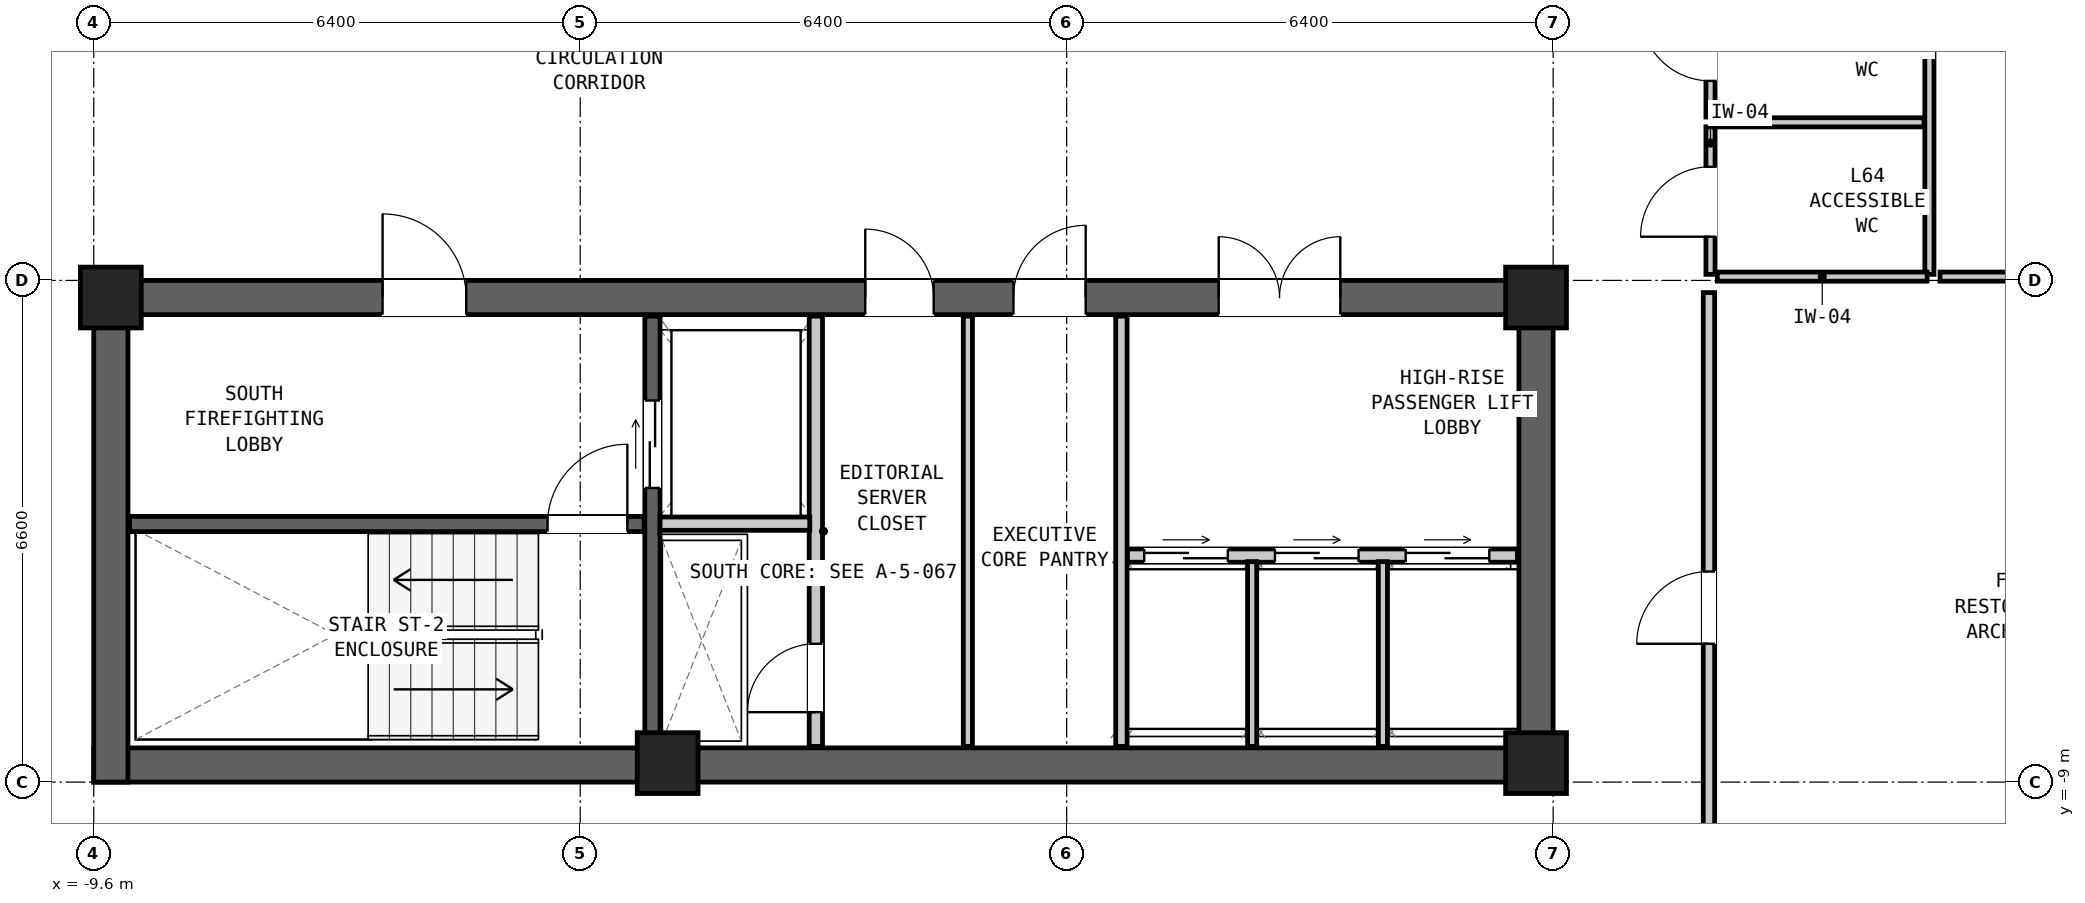
"""IFC4 building model, lengths in metres.
Left out: names, types, materials, properties, quantities, classifications, styles, units other than length and angle.
Written with IfcOpenShell. Run it as: python <this file> out.ifc"""

import sys

from ifc_helpers import new_model, si_unit, direction, frame, frame_2d, origin, origin_2d, place, context, subcontext, project, spatial, rectangle, extrude, element, fill, save


model = new_model("IFC4")
c1 = context("Model", 3, precision=1e-05, world=origin(), true_north=direction((0.0, 1.0)))
c2 = subcontext(c1, "Body", "Model", "MODEL_VIEW")
j1 = project(units=[si_unit("LENGTHUNIT", "METRE"), si_unit("PLANEANGLEUNIT", "RADIAN")], contexts=[c1])
p1 = place(None, origin())
s1 = spatial("IfcSite", under=j1, at=p1, CompositionType="ELEMENT")
p2 = place(p1, origin())
s2 = spatial("IfcBuilding", under=s1, at=p2, CompositionType="ELEMENT")
p3 = place(p2, frame((0.0, 0.0, 217.8)))
s3 = spatial("IfcBuildingStorey", under=s2, at=p3, CompositionType="ELEMENT", Elevation=217.8)
p4 = place(p3, frame((-9.6, -8.775, 0.0), z_axis=(0.0, 0.0, 1.0), x_axis=(1.0, 0.0, 0.0)))
e1 = element("IfcWall", 1, at=p4, inside=s3, PredefinedType="SHEAR", context=c2, shape_type="SweptSolid", body=[
    extrude(rectangle(XDim=19.2, YDim=0.45, at=frame_2d((9.6, 0.0))), origin(), (0.0, 0.0, 1.0), 3.05),
])
p5 = place(p3, frame((-9.6, -2.625, 0.0), z_axis=(0.0, 0.0, 1.0), x_axis=(1.0, 0.0, 0.0)))
e2 = element("IfcWall", 2, at=p5, inside=s3, PredefinedType="SHEAR", context=c2, shape_type="SweptSolid", body=[
    extrude(rectangle(XDim=19.2, YDim=0.45, at=frame_2d((9.6, 0.0))), origin(), (0.0, 0.0, 1.0), 3.05),
])
p6 = place(p5, frame((3.8, 0.0, 0.0)))
e3 = element("IfcOpeningElement", 3, at=p6, cuts=e2, PredefinedType="OPENING", context=c2, shape_type="SweptSolid", body=[
    extrude(rectangle(XDim=1.1, YDim=2.08, at=frame_2d((0.55, 1.04))), frame((0.0, 0.237, 0.0), z_axis=(0.0, -1.0, 0.0), x_axis=(1.0, 0.0, 0.0)), (0.0, 0.0, 1.0), 0.474),
])
p7 = place(p5, frame((10.15, 0.0, 0.0)))
e4 = element("IfcOpeningElement", 4, at=p7, cuts=e2, PredefinedType="OPENING", context=c2, shape_type="SweptSolid", body=[
    extrude(rectangle(XDim=0.9, YDim=2.05, at=frame_2d((0.45, 1.025))), frame((0.0, 0.237, 0.0), z_axis=(0.0, -1.0, 0.0), x_axis=(1.0, 0.0, 0.0)), (0.0, 0.0, 1.0), 0.474),
])
p8 = place(p5, frame((12.1, 0.0, 0.0)))
e5 = element("IfcOpeningElement", 5, at=p8, cuts=e2, PredefinedType="OPENING", context=c2, shape_type="SweptSolid", body=[
    extrude(rectangle(XDim=0.95, YDim=2.1, at=frame_2d((0.475, 1.05))), frame((0.0, 0.237, 0.0), z_axis=(0.0, -1.0, 0.0), x_axis=(1.0, 0.0, 0.0)), (0.0, 0.0, 1.0), 0.474),
])
p9 = place(p5, frame((14.8, 0.0, 0.0)))
e6 = element("IfcOpeningElement", 6, at=p9, cuts=e2, PredefinedType="OPENING", context=c2, shape_type="SweptSolid", body=[
    extrude(rectangle(XDim=1.6, YDim=2.12, at=frame_2d((0.8, 1.06))), frame((0.0, 0.237, 0.0), z_axis=(0.0, -1.0, 0.0), x_axis=(1.0, 0.0, 0.0)), (0.0, 0.0, 1.0), 0.474),
])
for number, where, z_axis, x_axis in (
    (7, (-9.375, -9.0, 0.0), (0.0, 0.0, 1.0), (0.0, 1.0, 0.0)),
    (8, (9.375, -9.0, 0.0), (0.0, 0.0, 1.0), (0.0, 1.0, 0.0)),
):
    element("IfcWall", number, at=place(p3, frame(where, z_axis=z_axis, x_axis=x_axis)), inside=s3, PredefinedType="SHEAR", context=c2, shape_type="SweptSolid", body=[
        extrude(rectangle(XDim=6.6, YDim=0.45, at=frame_2d((3.3, 0.0))), origin(), (0.0, 0.0, 1.0), 3.05),
    ])
for number, where, z_axis, x_axis in (
    (9, (-9.375, -2.625, 0.0), (0.0, 0.0, 1.0), (1.0, 0.0, 0.0)),
    (10, (9.375, -2.625, 0.0), (0.0, 0.0, 1.0), (1.0, 0.0, 0.0)),
    (11, (-2.05, -8.75, 0.0), (0.0, 0.0, 1.0), (1.0, 0.0, 0.0)),
    (12, (9.375, -8.75, 0.0), (0.0, 0.0, 1.0), (1.0, 0.0, 0.0)),
):
    element("IfcColumn", number, at=place(p3, frame(where, z_axis=z_axis, x_axis=x_axis)), inside=s3, PredefinedType="COLUMN", context=c2, shape_type="SweptSolid", body=[
        extrude(rectangle(XDim=0.8, YDim=0.8, at=origin_2d()), origin(), (0.0, 0.0, 1.0), 3.05),
    ])
p10 = place(p3, frame((-9.13, -5.605, 0.0), z_axis=(0.0, 0.0, 1.0), x_axis=(1.0, 0.0, 0.0)))
e13 = element("IfcWall", 13, at=p10, inside=s3, PredefinedType="SHEAR", context=c2, shape_type="SweptSolid", body=[
    extrude(rectangle(XDim=6.77, YDim=0.2, at=frame_2d((3.385, 0.0))), origin(), (0.0, 0.0, 1.0), 2.86),
])
p11 = place(p10, frame((5.5, 0.0, 0.0)))
e14 = element("IfcOpeningElement", 14, at=p11, cuts=e13, PredefinedType="OPENING", context=c2, shape_type="SweptSolid", body=[
    extrude(rectangle(XDim=1.05, YDim=2.08, at=frame_2d((0.525, 1.04))), frame((0.0, 0.112, 0.0), z_axis=(0.0, -1.0, 0.0), x_axis=(1.0, 0.0, 0.0)), (0.0, 0.0, 1.0), 0.224),
])
p12 = place(p3, frame((-2.25, -8.53, 0.0), z_axis=(0.0, 0.0, 1.0), x_axis=(0.0, 1.0, 0.0)))
e15 = element("IfcWall", 15, at=p12, inside=s3, PredefinedType="SHEAR", context=c2, shape_type="SweptSolid", body=[
    extrude(rectangle(XDim=5.66, YDim=0.2, at=frame_2d((2.83, 0.0))), origin(), (0.0, 0.0, 1.0), 2.86),
])
p13 = place(p12, frame((3.4, 0.0, 0.0)))
e16 = element("IfcOpeningElement", 16, at=p13, cuts=e15, PredefinedType="OPENING", context=c2, shape_type="SweptSolid", body=[
    extrude(rectangle(XDim=1.15, YDim=2.08, at=frame_2d((0.575, 1.04))), frame((0.0, 0.112, 0.0), z_axis=(0.0, -1.0, 0.0), x_axis=(1.0, 0.0, 0.0)), (0.0, 0.0, 1.0), 0.224),
])
p14 = place(p3, frame((-0.1, -8.53, 0.0), z_axis=(0.0, 0.0, 1.0), x_axis=(0.0, 1.0, 0.0)))
e17 = element("IfcWall", 17, at=p14, inside=s3, PredefinedType="PARTITIONING", context=c2, shape_type="SweptSolid", body=[
    extrude(rectangle(XDim=5.66, YDim=0.175, at=frame_2d((2.83, 0.0))), origin(), (0.0, 0.0, 1.0), 2.86),
])
p15 = place(p14, frame((0.45, 0.0, 0.0)))
e18 = element("IfcOpeningElement", 18, at=p15, cuts=e17, PredefinedType="OPENING", context=c2, shape_type="SweptSolid", body=[
    extrude(rectangle(XDim=0.9, YDim=2.05, at=frame_2d((0.45, 1.025))), frame((0.0, 0.1, 0.0), z_axis=(0.0, -1.0, 0.0), x_axis=(1.0, 0.0, 0.0)), (0.0, 0.0, 1.0), 0.199),
])
p16 = place(p3, frame((-2.15, -5.6, 0.0), z_axis=(0.0, 0.0, 1.0), x_axis=(1.0, 0.0, 0.0)))
e19 = element("IfcWall", 19, at=p16, inside=s3, PredefinedType="PARTITIONING", context=c2, shape_type="SweptSolid", body=[
    extrude(rectangle(XDim=1.97, YDim=0.175, at=frame_2d((0.985, 0.0))), origin(), (0.0, 0.0, 1.0), 2.86),
])
p17 = place(p3, frame((3.92, -8.53, 0.0), z_axis=(0.0, 0.0, 1.0), x_axis=(0.0, 1.0, 0.0)))
e20 = element("IfcWall", 20, at=p17, inside=s3, PredefinedType="PARTITIONING", context=c2, shape_type="SweptSolid", body=[
    extrude(rectangle(XDim=5.66, YDim=0.15, at=frame_2d((2.83, 0.0))), origin(), (0.0, 0.0, 1.0), 2.86),
])
p18 = place(p3, frame((1.9, -8.53, 0.0), z_axis=(0.0, 0.0, 1.0), x_axis=(0.0, 1.0, 0.0)))
e21 = element("IfcWall", 21, at=p18, inside=s3, PredefinedType="PARTITIONING", context=c2, shape_type="SweptSolid", body=[
    extrude(rectangle(XDim=5.66, YDim=0.12, at=frame_2d((2.83, 0.0))), origin(), (0.0, 0.0, 1.0), 2.86),
])
p19 = place(p3, frame((4.0, -6.02, 0.0), z_axis=(0.0, 0.0, 1.0), x_axis=(1.0, 0.0, 0.0)))
e22 = element("IfcWall", 22, at=p19, inside=s3, PredefinedType="PARTITIONING", context=c2, shape_type="SweptSolid", body=[
    extrude(rectangle(XDim=5.13, YDim=0.175, at=frame_2d((2.565, 0.0))), origin(), (0.0, 0.0, 1.0), 2.86),
])
p20 = place(p19, frame((0.22, 0.0, 0.0)))
e23 = element("IfcOpeningElement", 23, at=p20, cuts=e22, PredefinedType="OPENING", context=c2, shape_type="SweptSolid", body=[
    extrude(rectangle(XDim=1.1, YDim=2.06, at=frame_2d((0.55, 1.03))), frame((0.0, 0.1, 0.0), z_axis=(0.0, -1.0, 0.0), x_axis=(1.0, 0.0, 0.0)), (0.0, 0.0, 1.0), 0.199),
])
p21 = place(p19, frame((1.94, 0.0, 0.0)))
e24 = element("IfcOpeningElement", 24, at=p21, cuts=e22, PredefinedType="OPENING", context=c2, shape_type="SweptSolid", body=[
    extrude(rectangle(XDim=1.1, YDim=2.06, at=frame_2d((0.55, 1.03))), frame((0.0, 0.1, 0.0), z_axis=(0.0, -1.0, 0.0), x_axis=(1.0, 0.0, 0.0)), (0.0, 0.0, 1.0), 0.199),
])
p22 = place(p19, frame((3.66, 0.0, 0.0)))
e25 = element("IfcOpeningElement", 25, at=p22, cuts=e22, PredefinedType="OPENING", context=c2, shape_type="SweptSolid", body=[
    extrude(rectangle(XDim=1.1, YDim=2.06, at=frame_2d((0.55, 1.03))), frame((0.0, 0.1, 0.0), z_axis=(0.0, -1.0, 0.0), x_axis=(1.0, 0.0, 0.0)), (0.0, 0.0, 1.0), 0.199),
])
for number, where, z_axis, x_axis in (
    (26, (5.64, -8.53, 0.0), (0.0, 0.0, 1.0), (0.0, 1.0, 0.0)),
    (27, (7.36, -8.53, 0.0), (0.0, 0.0, 1.0), (0.0, 1.0, 0.0)),
):
    element("IfcWall", number, at=place(p3, frame(where, z_axis=z_axis, x_axis=x_axis)), inside=s3, PredefinedType="PARTITIONING", context=c2, shape_type="SweptSolid", body=[
        extrude(rectangle(XDim=2.43, YDim=0.12, at=frame_2d((1.215, 0.0))), origin(), (0.0, 0.0, 1.0), 2.86),
    ])
p23 = place(p3, frame((11.67, -2.32, 0.0), z_axis=(0.0, 0.0, 1.0), x_axis=(0.0, 1.0, 0.0)))
e28 = element("IfcWall", 28, at=p23, inside=s3, PredefinedType="PARTITIONING", context=c2, shape_type="SweptSolid", body=[
    extrude(rectangle(XDim=1.94, YDim=0.12, at=frame_2d((0.97, 0.0))), origin(), (0.0, 0.0, 1.0), 2.86),
])
p24 = place(p23, frame((0.495, 0.0, 0.0)))
e29 = element("IfcOpeningElement", 29, at=p24, cuts=e28, PredefinedType="OPENING", context=c2, shape_type="SweptSolid", body=[
    extrude(rectangle(XDim=0.92, YDim=2.1, at=frame_2d((0.46, 1.05))), frame((0.0, 0.072, 0.0), z_axis=(0.0, -1.0, 0.0), x_axis=(1.0, 0.0, 0.0)), (0.0, 0.0, 1.0), 0.144),
])
p25 = place(p3, frame((11.67, -0.25, 0.0), z_axis=(0.0, 0.0, 1.0), x_axis=(0.0, 1.0, 0.0)))
e30 = element("IfcWall", 30, at=p25, inside=s3, PredefinedType="PARTITIONING", context=c2, shape_type="SweptSolid", body=[
    extrude(rectangle(XDim=1.9, YDim=0.12, at=frame_2d((0.95, 0.0))), origin(), (0.0, 0.0, 1.0), 2.86),
])
p26 = place(p25, frame((0.475, 0.0, 0.0)))
e31 = element("IfcOpeningElement", 31, at=p26, cuts=e30, PredefinedType="OPENING", context=c2, shape_type="SweptSolid", body=[
    extrude(rectangle(XDim=0.92, YDim=2.1, at=frame_2d((0.46, 1.05))), frame((0.0, 0.072, 0.0), z_axis=(0.0, -1.0, 0.0), x_axis=(1.0, 0.0, 0.0)), (0.0, 0.0, 1.0), 0.144),
])
p27 = place(p3, frame((14.55, -2.32, 0.0), z_axis=(0.0, 0.0, 1.0), x_axis=(0.0, 1.0, 0.0)))
e32 = element("IfcWall", 32, at=p27, inside=s3, PredefinedType="PARTITIONING", context=c2, shape_type="SweptSolid", body=[
    extrude(rectangle(XDim=5.93, YDim=0.12, at=frame_2d((2.965, 0.0))), origin(), (0.0, 0.0, 1.0), 2.86),
])
p28 = place(p3, frame((11.76, -2.35, 0.0), z_axis=(0.0, 0.0, 1.0), x_axis=(1.0, 0.0, 0.0)))
e33 = element("IfcWall", 33, at=p28, inside=s3, PredefinedType="PARTITIONING", context=c2, shape_type="SweptSolid", body=[
    extrude(rectangle(XDim=2.76, YDim=0.12, at=frame_2d((1.38, 0.0))), origin(), (0.0, 0.0, 1.0), 1.981),
])
p29 = place(p3, frame((11.76, -0.32, 0.0), z_axis=(0.0, 0.0, 1.0), x_axis=(1.0, 0.0, 0.0)))
e34 = element("IfcWall", 34, at=p29, inside=s3, PredefinedType="PARTITIONING", context=c2, shape_type="SweptSolid", body=[
    extrude(rectangle(XDim=2.72, YDim=0.12, at=frame_2d((1.36, 0.0))), origin(), (0.0, 0.0, 1.0), 2.86),
])
p30 = place(p3, frame((14.69, -2.35, 0.0), z_axis=(0.0, 0.0, 1.0), x_axis=(1.0, 0.0, 0.0)))
e35 = element("IfcWall", 35, at=p30, inside=s3, PredefinedType="PARTITIONING", context=c2, shape_type="SweptSolid", body=[
    extrude(rectangle(XDim=4.69, YDim=0.12, at=frame_2d((2.345, 0.0))), origin(), (0.0, 0.0, 1.0), 1.981),
])
p31 = place(p3, frame((11.65, -10.85, 0.0), z_axis=(0.0, 0.0, 1.0), x_axis=(0.0, 1.0, 0.0)))
e36 = element("IfcWall", 36, at=p31, inside=s3, PredefinedType="PARTITIONING", context=c2, shape_type="SweptSolid", body=[
    extrude(rectangle(XDim=8.29, YDim=0.15, at=frame_2d((4.145, 0.0))), origin(), (0.0, 0.0, 1.0), 2.86),
])
p32 = place(p31, frame((3.67, 0.0, 0.0)))
e37 = element("IfcOpeningElement", 37, at=p32, cuts=e36, PredefinedType="OPENING", context=c2, shape_type="SweptSolid", body=[
    extrude(rectangle(XDim=0.95, YDim=2.1, at=frame_2d((0.475, 1.05))), frame((0.0, 0.087, 0.0), z_axis=(0.0, -1.0, 0.0), x_axis=(1.0, 0.0, 0.0)), (0.0, 0.0, 1.0), 0.174),
])
p33 = place(p11, origin())
e38 = element("IfcDoor", 38, at=p33, inside=s3, OperationType="SINGLE_SWING_RIGHT", PredefinedType="DOOR", context=c2, shape_type="SweptSolid", body=[
    extrude(rectangle(XDim=1.05, YDim=2.08, at=frame_2d((0.525, 1.04))), frame((0.0, 0.025, 0.0), z_axis=(0.0, -1.0, 0.0), x_axis=(1.0, 0.0, 0.0)), (0.0, 0.0, 1.0), 0.05),
])
fill(e14, e38)
p34 = place(p6, origin())
e39 = element("IfcDoor", 39, at=p34, inside=s3, OperationType="SINGLE_SWING_LEFT", PredefinedType="DOOR", context=c2, shape_type="SweptSolid", body=[
    extrude(rectangle(XDim=1.1, YDim=2.08, at=frame_2d((0.55, 1.04))), frame((0.0, 0.025, 0.0), z_axis=(0.0, -1.0, 0.0), x_axis=(1.0, 0.0, 0.0)), (0.0, 0.0, 1.0), 0.05),
])
fill(e3, e39)
p35 = place(p13, origin())
e40 = element("IfcDoor", 40, at=p35, inside=s3, OperationType="DOUBLE_DOOR_SLIDING", PredefinedType="DOOR", context=c2, shape_type="SweptSolid", body=[
    extrude(rectangle(XDim=1.15, YDim=2.08, at=frame_2d((0.575, 1.04))), frame((0.0, 0.025, 0.0), z_axis=(0.0, -1.0, 0.0), x_axis=(1.0, 0.0, 0.0)), (0.0, 0.0, 1.0), 0.05),
])
fill(e16, e40)
p36 = place(p15, origin())
e41 = element("IfcDoor", 41, at=p36, inside=s3, OperationType="SINGLE_SWING_LEFT", PredefinedType="DOOR", context=c2, shape_type="SweptSolid", body=[
    extrude(rectangle(XDim=0.9, YDim=2.05, at=frame_2d((0.45, 1.025))), frame((0.0, 0.025, 0.0), z_axis=(0.0, -1.0, 0.0), x_axis=(1.0, 0.0, 0.0)), (0.0, 0.0, 1.0), 0.05),
])
fill(e18, e41)
p37 = place(p7, origin())
e42 = element("IfcDoor", 42, at=p37, inside=s3, OperationType="SINGLE_SWING_LEFT", PredefinedType="DOOR", context=c2, shape_type="SweptSolid", body=[
    extrude(rectangle(XDim=0.9, YDim=2.05, at=frame_2d((0.45, 1.025))), frame((0.0, 0.025, 0.0), z_axis=(0.0, -1.0, 0.0), x_axis=(1.0, 0.0, 0.0)), (0.0, 0.0, 1.0), 0.05),
])
fill(e4, e42)
p38 = place(p8, origin())
e43 = element("IfcDoor", 43, at=p38, inside=s3, OperationType="SINGLE_SWING_RIGHT", PredefinedType="DOOR", context=c2, shape_type="SweptSolid", body=[
    extrude(rectangle(XDim=0.95, YDim=2.1, at=frame_2d((0.475, 1.05))), frame((0.0, 0.025, 0.0), z_axis=(0.0, -1.0, 0.0), x_axis=(1.0, 0.0, 0.0)), (0.0, 0.0, 1.0), 0.05),
])
fill(e5, e43)
p39 = place(p20, origin())
e44 = element("IfcDoor", 44, at=p39, inside=s3, OperationType="DOUBLE_DOOR_SLIDING", PredefinedType="DOOR", context=c2, shape_type="SweptSolid", body=[
    extrude(rectangle(XDim=1.1, YDim=2.06, at=frame_2d((0.55, 1.03))), frame((0.0, 0.025, 0.0), z_axis=(0.0, -1.0, 0.0), x_axis=(1.0, 0.0, 0.0)), (0.0, 0.0, 1.0), 0.05),
])
fill(e23, e44)
p40 = place(p21, origin())
e45 = element("IfcDoor", 45, at=p40, inside=s3, OperationType="DOUBLE_DOOR_SLIDING", PredefinedType="DOOR", context=c2, shape_type="SweptSolid", body=[
    extrude(rectangle(XDim=1.1, YDim=2.06, at=frame_2d((0.55, 1.03))), frame((0.0, 0.025, 0.0), z_axis=(0.0, -1.0, 0.0), x_axis=(1.0, 0.0, 0.0)), (0.0, 0.0, 1.0), 0.05),
])
fill(e24, e45)
p41 = place(p22, origin())
e46 = element("IfcDoor", 46, at=p41, inside=s3, OperationType="DOUBLE_DOOR_SLIDING", PredefinedType="DOOR", context=c2, shape_type="SweptSolid", body=[
    extrude(rectangle(XDim=1.1, YDim=2.06, at=frame_2d((0.55, 1.03))), frame((0.0, 0.025, 0.0), z_axis=(0.0, -1.0, 0.0), x_axis=(1.0, 0.0, 0.0)), (0.0, 0.0, 1.0), 0.05),
])
fill(e25, e46)
p42 = place(p9, origin())
e47 = element("IfcDoor", 47, at=p42, inside=s3, OperationType="DOUBLE_DOOR_SINGLE_SWING", PredefinedType="DOOR", context=c2, shape_type="SweptSolid", body=[
    extrude(rectangle(XDim=1.6, YDim=2.12, at=frame_2d((0.8, 1.06))), frame((0.0, 0.025, 0.0), z_axis=(0.0, -1.0, 0.0), x_axis=(1.0, 0.0, 0.0)), (0.0, 0.0, 1.0), 0.05),
])
fill(e6, e47)
p43 = place(p24, origin())
e48 = element("IfcDoor", 48, at=p43, inside=s3, OperationType="SINGLE_SWING_LEFT", PredefinedType="DOOR", context=c2, shape_type="SweptSolid", body=[
    extrude(rectangle(XDim=0.92, YDim=2.1, at=frame_2d((0.46, 1.05))), frame((0.0, 0.025, 0.0), z_axis=(0.0, -1.0, 0.0), x_axis=(1.0, 0.0, 0.0)), (0.0, 0.0, 1.0), 0.05),
])
fill(e29, e48)
p44 = place(p26, origin())
e49 = element("IfcDoor", 49, at=p44, inside=s3, OperationType="SINGLE_SWING_RIGHT", PredefinedType="DOOR", context=c2, shape_type="SweptSolid", body=[
    extrude(rectangle(XDim=0.92, YDim=2.1, at=frame_2d((0.46, 1.05))), frame((0.0, 0.025, 0.0), z_axis=(0.0, -1.0, 0.0), x_axis=(1.0, 0.0, 0.0)), (0.0, 0.0, 1.0), 0.05),
])
fill(e31, e49)
p45 = place(p32, origin())
e50 = element("IfcDoor", 50, at=p45, inside=s3, OperationType="SINGLE_SWING_LEFT", PredefinedType="DOOR", context=c2, shape_type="SweptSolid", body=[
    extrude(rectangle(XDim=0.95, YDim=2.1, at=frame_2d((0.475, 1.05))), frame((0.0, 0.025, 0.0), z_axis=(0.0, -1.0, 0.0), x_axis=(1.0, 0.0, 0.0)), (0.0, 0.0, 1.0), 0.05),
])
fill(e37, e50)
save(model, sys.argv[1])
